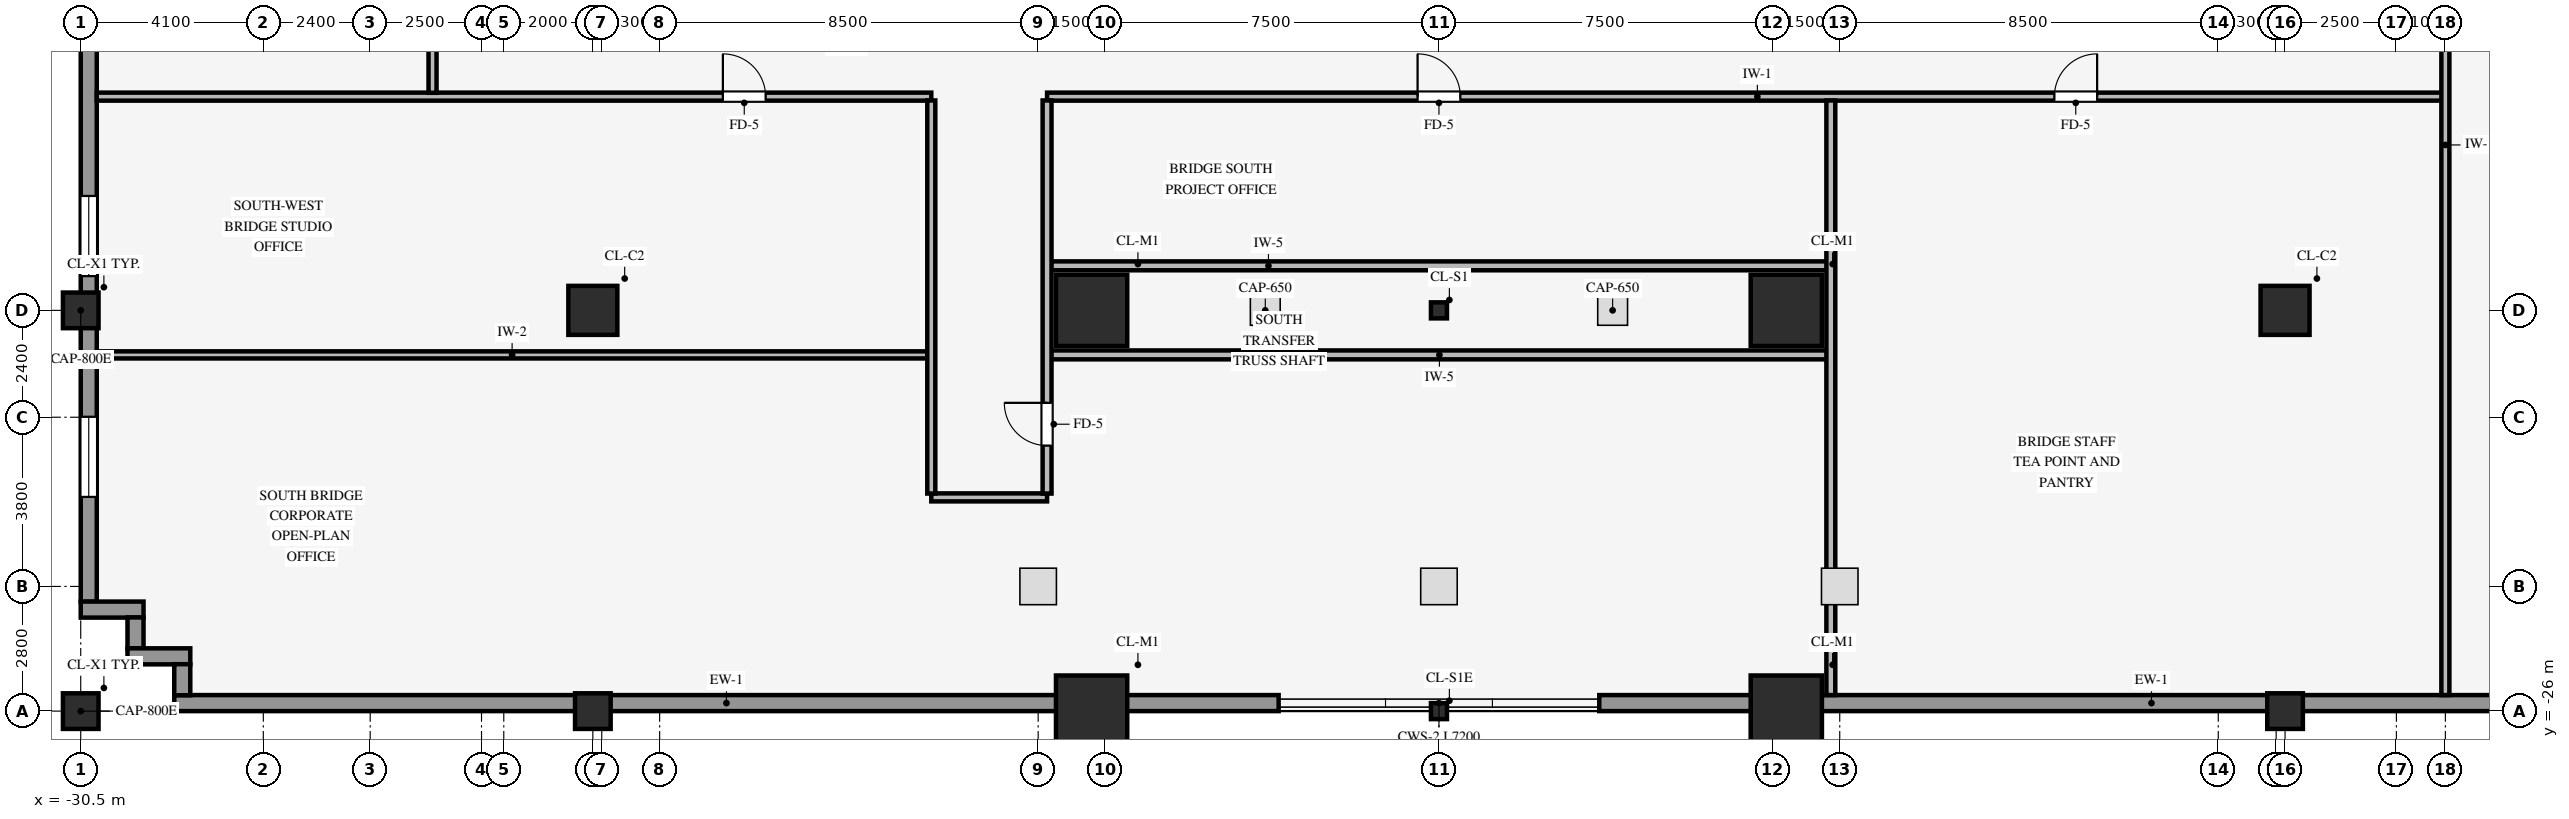
"""IFC4 building model, lengths in metres.
Left out: names, types, materials, properties, quantities, classifications, styles, units other than length and angle.
Written with IfcOpenShell. Run it as: python <this file> out.ifc"""

import sys

from ifc_helpers import new_model, si_unit, direction, frame, frame_2d, origin, origin_2d, place, context, subcontext, project, spatial, rectangle, hollow_rectangle, i_section, extrude, source, transform, mapped, element, fill, save


model = new_model("IFC4")
c1 = context("Model", 3, precision=1e-05, world=origin(), true_north=direction((0.0, 1.0)))
c2 = subcontext(c1, "Body", "Model", "MODEL_VIEW")
j1 = project(units=[si_unit("LENGTHUNIT", "METRE"), si_unit("PLANEANGLEUNIT", "RADIAN")], contexts=[c1])
p1 = place(None, origin())
s1 = spatial("IfcSite", under=j1, at=p1, CompositionType="ELEMENT")
p2 = place(p1, origin())
s2 = spatial("IfcBuilding", under=s1, at=p2, CompositionType="ELEMENT")
p3 = place(p2, frame((0.0, 0.0, 23.0)))
s3 = spatial("IfcBuildingStorey", under=s2, at=p3, CompositionType="ELEMENT", Elevation=23.0)
for number, where, z_axis, x_axis in (
    (1, (-7.8, -26.0, 0.0), (0.0, 0.0, 1.0), (1.0, 0.0, 0.0)),
    (2, (-7.8, -17.0, 0.0), (0.0, 0.0, 1.0), (1.0, 0.0, 0.0)),
    (3, (7.8, -26.0, 0.0), (0.0, 0.0, 1.0), (1.0, 0.0, 0.0)),
    (4, (7.8, -17.0, 0.0), (0.0, 0.0, 1.0), (1.0, 0.0, 0.0)),
):
    element("IfcColumn", number, at=place(p3, frame(where, z_axis=z_axis, x_axis=x_axis)), inside=s3, PredefinedType="COLUMN", context=c2, shape_type="SweptSolid", body=[
        extrude(rectangle(XDim=1.6, YDim=1.6, at=origin_2d()), origin(), (0.0, 0.0, 1.0), 4.2),
    ])
p4 = place(p3, frame((-30.5, -26.0, -0.4), z_axis=(0.0, 0.0, 1.0), x_axis=(1.0, 0.0, 0.0)))
e5 = element("IfcColumn", 5, at=p4, inside=s3, PredefinedType="COLUMN", context=c2, shape_type="SweptSolid", body=[
    extrude(hollow_rectangle(XDim=0.8, YDim=0.8, WallThickness=0.055, InnerFilletRadius=0.055, OuterFilletRadius=0.11, at=origin_2d()), origin(), (0.0, 0.0, 1.0), 4.6),
])
for number, where, z_axis, x_axis in (
    (6, (-30.5, -17.0, 0.0), (0.0, 0.0, 1.0), (1.0, 0.0, 0.0)),
    (7, (-19.0, -26.0, 0.0), (0.0, 0.0, 1.0), (1.0, 0.0, 0.0)),
):
    element("IfcColumn", number, at=place(p3, frame(where, z_axis=z_axis, x_axis=x_axis)), inside=s3, PredefinedType="COLUMN", context=c2, shape_type="SweptSolid", body=[
        extrude(hollow_rectangle(XDim=0.8, YDim=0.8, WallThickness=0.055, InnerFilletRadius=0.055, OuterFilletRadius=0.11, at=origin_2d()), origin(), (0.0, 0.0, 1.0), 4.2),
    ])
p5 = place(p3, frame((-19.0, -17.0, 0.0), z_axis=(0.0, 0.0, 1.0), x_axis=(1.0, 0.0, 0.0)))
e8 = element("IfcColumn", 8, at=p5, inside=s3, PredefinedType="COLUMN", context=c2, shape_type="SweptSolid", body=[
    extrude(rectangle(XDim=1.1, YDim=1.1, at=origin_2d()), origin(), (0.0, 0.0, 1.0), 4.2),
])
p6 = place(p3, frame((19.0, -26.0, 0.0), z_axis=(0.0, 0.0, 1.0), x_axis=(1.0, 0.0, 0.0)))
e9 = element("IfcColumn", 9, at=p6, inside=s3, PredefinedType="COLUMN", context=c2, shape_type="SweptSolid", body=[
    extrude(hollow_rectangle(XDim=0.8, YDim=0.8, WallThickness=0.055, InnerFilletRadius=0.055, OuterFilletRadius=0.11, at=origin_2d()), origin(), (0.0, 0.0, 1.0), 4.2),
])
p7 = place(p3, frame((19.0, -17.0, 0.0), z_axis=(0.0, 0.0, 1.0), x_axis=(1.0, 0.0, 0.0)))
e10 = element("IfcColumn", 10, at=p7, inside=s3, PredefinedType="COLUMN", context=c2, shape_type="SweptSolid", body=[
    extrude(rectangle(XDim=1.1, YDim=1.1, at=origin_2d()), origin(), (0.0, 0.0, 1.0), 4.2),
])
for number, where, z_axis, x_axis in (
    (11, (0.0, -26.0, 0.0), (0.0, 0.0, 1.0), (1.0, 0.0, 0.0)),
    (12, (0.0, -17.0, 0.0), (0.0, 0.0, 1.0), (1.0, 0.0, 0.0)),
):
    element("IfcColumn", number, at=place(p3, frame(where, z_axis=z_axis, x_axis=x_axis)), inside=s3, PredefinedType="COLUMN", context=c2, shape_type="SweptSolid", body=[
        extrude(i_section(OverallWidth=0.36, OverallDepth=0.36, WebThickness=0.021, FlangeThickness=0.021, FilletRadius=0.018, at=origin_2d()), origin(), (0.0, 0.0, 1.0), 4.2),
    ])
for number, where, z_axis, x_axis in (
    (13, (-28.4, -25.82, 0.0), (0.0, 0.0, 1.0), (1.0, 0.0, 0.0)),
    (14, (3.6, -25.82, 0.0), (0.0, 0.0, 1.0), (1.0, 0.0, 0.0)),
):
    element("IfcWall", number, at=place(p3, frame(where, z_axis=z_axis, x_axis=x_axis)), inside=s3, PredefinedType="STANDARD", context=c2, shape_type="SweptSolid", body=[
        extrude(rectangle(XDim=24.8, YDim=0.36, at=frame_2d((12.4, 0.0))), origin(), (0.0, 0.0, 1.0), 2.785),
    ])
p8 = place(p3, frame((-30.32, -23.544, 0.0), z_axis=(0.0, 0.0, 1.0), x_axis=(0.0, 1.0, 0.0)))
e15 = element("IfcWall", 15, at=p8, inside=s3, PredefinedType="STANDARD", context=c2, shape_type="SweptSolid", body=[
    extrude(rectangle(XDim=47.088, YDim=0.36, at=frame_2d((23.544, 0.0))), origin(), (0.0, 0.0, 1.0), 3.702),
])
p9 = place(p8, frame((2.354, 0.0, 0.85)))
e16 = element("IfcOpeningElement", 16, at=p9, cuts=e15, PredefinedType="OPENING", context=c2, shape_type="SweptSolid", body=[
    extrude(rectangle(XDim=1.8, YDim=2.35, at=frame_2d((0.9, 1.175))), frame((0.0, 0.19, 0.0), z_axis=(0.0, -1.0, 0.0), x_axis=(1.0, 0.0, 0.0)), (0.0, 0.0, 1.0), 0.38),
])
p10 = place(p8, frame((7.313, 0.0, 0.85)))
e17 = element("IfcOpeningElement", 17, at=p10, cuts=e15, PredefinedType="OPENING", context=c2, shape_type="SweptSolid", body=[
    extrude(rectangle(XDim=1.8, YDim=2.35, at=frame_2d((0.9, 1.175))), frame((0.0, 0.19, 0.0), z_axis=(0.0, -1.0, 0.0), x_axis=(1.0, 0.0, 0.0)), (0.0, 0.0, 1.0), 0.38),
])
p11 = place(p8, frame((15.881, 0.0, 0.85)))
e18 = element("IfcOpeningElement", 18, at=p11, cuts=e15, PredefinedType="OPENING", context=c2, shape_type="SweptSolid", body=[
    extrude(rectangle(XDim=1.8, YDim=2.35, at=frame_2d((0.9, 1.175))), frame((0.0, 0.19, 0.0), z_axis=(0.0, -1.0, 0.0), x_axis=(1.0, 0.0, 0.0)), (0.0, 0.0, 1.0), 0.38),
])
p12 = place(p8, frame((20.39, 0.0, 0.85)))
e19 = element("IfcOpeningElement", 19, at=p12, cuts=e15, PredefinedType="OPENING", context=c2, shape_type="SweptSolid", body=[
    extrude(rectangle(XDim=1.8, YDim=2.35, at=frame_2d((0.9, 1.175))), frame((0.0, 0.19, 0.0), z_axis=(0.0, -1.0, 0.0), x_axis=(1.0, 0.0, 0.0)), (0.0, 0.0, 1.0), 0.38),
])
p13 = place(p8, frame((24.898, 0.0, 0.85)))
e20 = element("IfcOpeningElement", 20, at=p13, cuts=e15, PredefinedType="OPENING", context=c2, shape_type="SweptSolid", body=[
    extrude(rectangle(XDim=1.8, YDim=2.35, at=frame_2d((0.9, 1.175))), frame((0.0, 0.19, 0.0), z_axis=(0.0, -1.0, 0.0), x_axis=(1.0, 0.0, 0.0)), (0.0, 0.0, 1.0), 0.38),
])
p14 = place(p8, frame((29.407, 0.0, 0.85)))
e21 = element("IfcOpeningElement", 21, at=p14, cuts=e15, PredefinedType="OPENING", context=c2, shape_type="SweptSolid", body=[
    extrude(rectangle(XDim=1.8, YDim=2.35, at=frame_2d((0.9, 1.175))), frame((0.0, 0.19, 0.0), z_axis=(0.0, -1.0, 0.0), x_axis=(1.0, 0.0, 0.0)), (0.0, 0.0, 1.0), 0.38),
])
p15 = place(p8, frame((37.975, 0.0, 0.85)))
e22 = element("IfcOpeningElement", 22, at=p15, cuts=e15, PredefinedType="OPENING", context=c2, shape_type="SweptSolid", body=[
    extrude(rectangle(XDim=1.8, YDim=2.35, at=frame_2d((0.9, 1.175))), frame((0.0, 0.19, 0.0), z_axis=(0.0, -1.0, 0.0), x_axis=(1.0, 0.0, 0.0)), (0.0, 0.0, 1.0), 0.38),
])
p16 = place(p8, frame((42.934, 0.0, 0.85)))
e23 = element("IfcOpeningElement", 23, at=p16, cuts=e15, PredefinedType="OPENING", context=c2, shape_type="SweptSolid", body=[
    extrude(rectangle(XDim=1.8, YDim=2.35, at=frame_2d((0.9, 1.175))), frame((0.0, 0.19, 0.0), z_axis=(0.0, -1.0, 0.0), x_axis=(1.0, 0.0, 0.0)), (0.0, 0.0, 1.0), 0.38),
])
p17 = place(p3, frame((-30.5, -23.72, 0.0), z_axis=(0.0, 0.0, 1.0), x_axis=(1.0, 0.0, 0.0)))
e24 = element("IfcWall", 24, at=p17, inside=s3, PredefinedType="STANDARD", context=c2, shape_type="SweptSolid", body=[
    extrude(rectangle(XDim=1.41, YDim=0.36, at=frame_2d((0.705, 0.0))), origin(), (0.0, 0.0, 1.0), 4.19),
])
p18 = place(p3, frame((-29.27, -24.594, 0.0), z_axis=(0.0, 0.0, 1.0), x_axis=(0.0, 1.0, 0.0)))
e25 = element("IfcWall", 25, at=p18, inside=s3, PredefinedType="STANDARD", context=c2, shape_type="SweptSolid", body=[
    extrude(rectangle(XDim=0.698, YDim=0.36, at=frame_2d((0.349, 0.0))), origin(), (0.0, 0.0, 1.0), 4.19),
])
p19 = place(p3, frame((-29.45, -24.77, 0.0), z_axis=(0.0, 0.0, 1.0), x_axis=(1.0, 0.0, 0.0)))
e26 = element("IfcWall", 26, at=p19, inside=s3, PredefinedType="STANDARD", context=c2, shape_type="SweptSolid", body=[
    extrude(rectangle(XDim=1.41, YDim=0.36, at=frame_2d((0.705, 0.0))), origin(), (0.0, 0.0, 1.0), 4.19),
])
p20 = place(p3, frame((-28.22, -25.644, 0.0), z_axis=(0.0, 0.0, 1.0), x_axis=(0.0, 1.0, 0.0)))
e27 = element("IfcWall", 27, at=p20, inside=s3, PredefinedType="STANDARD", context=c2, shape_type="SweptSolid", body=[
    extrude(rectangle(XDim=0.698, YDim=0.36, at=frame_2d((0.349, 0.0))), origin(), (0.0, 0.0, 1.0), 4.19),
])
p21 = place(p3, frame((-11.4, -21.2, 0.0), z_axis=(0.0, 0.0, 1.0), x_axis=(1.0, 0.0, 0.0)))
e28 = element("IfcWall", 28, at=p21, inside=s3, PredefinedType="PARTITIONING", context=c2, shape_type="SweptSolid", body=[
    extrude(rectangle(XDim=2.6, YDim=0.18, at=frame_2d((1.3, 0.0))), origin(), (0.0, 0.0, 1.0), 4.19),
])
p22 = place(p3, frame((-30.14, -18.0, 0.0), z_axis=(0.0, 0.0, 1.0), x_axis=(1.0, 0.0, 0.0)))
e29 = element("IfcWall", 29, at=p22, inside=s3, PredefinedType="PARTITIONING", context=c2, shape_type="SweptSolid", body=[
    extrude(rectangle(XDim=18.654, YDim=0.16, at=frame_2d((9.327, 0.0))), origin(), (0.0, 0.0, 1.0), 4.19),
])
for number, where, z_axis, x_axis in (
    (30, (-8.714, -18.0, 0.0), (0.0, 0.0, 1.0), (1.0, 0.0, 0.0)),
    (31, (-8.714, -16.0, 0.0), (0.0, 0.0, 1.0), (1.0, 0.0, 0.0)),
):
    element("IfcWall", number, at=place(p3, frame(where, z_axis=z_axis, x_axis=x_axis)), inside=s3, PredefinedType="STANDARD", context=c2, shape_type="SweptSolid", body=[
        extrude(rectangle(XDim=17.448, YDim=0.2, at=frame_2d((8.724, 0.0))), origin(), (0.0, 0.0, 1.0), 4.19),
    ])
p23 = place(p3, frame((-30.14, -12.2, 0.0), z_axis=(0.0, 0.0, 1.0), x_axis=(1.0, 0.0, 0.0)))
e32 = element("IfcWall", 32, at=p23, inside=s3, PredefinedType="PARTITIONING", context=c2, shape_type="SweptSolid", body=[
    extrude(rectangle(XDim=18.74, YDim=0.18, at=frame_2d((9.37, 0.0))), origin(), (0.0, 0.0, 1.0), 4.19),
])
p24 = place(p23, frame((14.06, 0.0, 0.0)))
e33 = element("IfcOpeningElement", 33, at=p24, cuts=e32, PredefinedType="OPENING", context=c2, shape_type="SweptSolid", body=[
    extrude(rectangle(XDim=0.96, YDim=2.1, at=frame_2d((0.48, 1.05))), frame((0.0, 0.1, 0.0), z_axis=(0.0, -1.0, 0.0), x_axis=(1.0, 0.0, 0.0)), (0.0, 0.0, 1.0), 0.2),
])
p25 = place(p3, frame((-8.8, -12.2, 0.0), z_axis=(0.0, 0.0, 1.0), x_axis=(1.0, 0.0, 0.0)))
e34 = element("IfcWall", 34, at=p25, inside=s3, PredefinedType="PARTITIONING", context=c2, shape_type="SweptSolid", body=[
    extrude(rectangle(XDim=31.334, YDim=0.18, at=frame_2d((15.667, 0.0))), origin(), (0.0, 0.0, 1.0), 4.19),
])
p26 = place(p25, frame((8.32, 0.0, 0.0)))
e35 = element("IfcOpeningElement", 35, at=p26, cuts=e34, PredefinedType="OPENING", context=c2, shape_type="SweptSolid", body=[
    extrude(rectangle(XDim=0.96, YDim=2.1, at=frame_2d((0.48, 1.05))), frame((0.0, 0.1, 0.0), z_axis=(0.0, -1.0, 0.0), x_axis=(1.0, 0.0, 0.0)), (0.0, 0.0, 1.0), 0.2),
])
p27 = place(p25, frame((22.62, 0.0, 0.0)))
e36 = element("IfcOpeningElement", 36, at=p27, cuts=e34, PredefinedType="OPENING", context=c2, shape_type="SweptSolid", body=[
    extrude(rectangle(XDim=0.96, YDim=2.1, at=frame_2d((0.48, 1.05))), frame((0.0, 0.1, 0.0), z_axis=(0.0, -1.0, 0.0), x_axis=(1.0, 0.0, 0.0)), (0.0, 0.0, 1.0), 0.2),
])
p28 = place(p3, frame((-22.6, -12.114, 0.0), z_axis=(0.0, 0.0, 1.0), x_axis=(0.0, 1.0, 0.0)))
e37 = element("IfcWall", 37, at=p28, inside=s3, PredefinedType="PARTITIONING", context=c2, shape_type="SweptSolid", body=[
    extrude(rectangle(XDim=24.228, YDim=0.18, at=frame_2d((12.114, 0.0))), origin(), (0.0, 0.0, 1.0), 4.19),
])
p29 = place(p28, frame((11.634, 0.0, 0.0)))
e38 = element("IfcOpeningElement", 38, at=p29, cuts=e37, PredefinedType="OPENING", context=c2, shape_type="SweptSolid", body=[
    extrude(rectangle(XDim=0.96, YDim=2.1, at=frame_2d((0.48, 1.05))), frame((0.0, 0.1, 0.0), z_axis=(0.0, -1.0, 0.0), x_axis=(1.0, 0.0, 0.0)), (0.0, 0.0, 1.0), 0.2),
])
p30 = place(p3, frame((-11.4, -21.114, 0.0), z_axis=(0.0, 0.0, 1.0), x_axis=(0.0, 1.0, 0.0)))
e39 = element("IfcWall", 39, at=p30, inside=s3, PredefinedType="PARTITIONING", context=c2, shape_type="SweptSolid", body=[
    extrude(rectangle(XDim=8.828, YDim=0.18, at=frame_2d((4.414, 0.0))), origin(), (0.0, 0.0, 1.0), 4.19),
])
p31 = place(p3, frame((-8.8, -21.114, 0.0), z_axis=(0.0, 0.0, 1.0), x_axis=(0.0, 1.0, 0.0)))
e40 = element("IfcWall", 40, at=p31, inside=s3, PredefinedType="STANDARD", context=c2, shape_type="SweptSolid", body=[
    extrude(rectangle(XDim=8.828, YDim=0.2, at=frame_2d((4.414, 0.0))), origin(), (0.0, 0.0, 1.0), 2.785),
])
p32 = place(p31, frame((1.077, 0.0, 0.0)))
e41 = element("IfcOpeningElement", 41, at=p32, cuts=e40, PredefinedType="OPENING", context=c2, shape_type="SweptSolid", body=[
    extrude(rectangle(XDim=0.96, YDim=2.1, at=frame_2d((0.48, 1.05))), frame((0.0, 0.11, 0.0), z_axis=(0.0, -1.0, 0.0), x_axis=(1.0, 0.0, 0.0)), (0.0, 0.0, 1.0), 0.22),
])
p33 = place(p3, frame((8.8, -25.64, 0.0), z_axis=(0.0, 0.0, 1.0), x_axis=(0.0, 1.0, 0.0)))
e42 = element("IfcWall", 42, at=p33, inside=s3, PredefinedType="STANDARD", context=c2, shape_type="SweptSolid", body=[
    extrude(rectangle(XDim=13.354, YDim=0.2, at=frame_2d((6.677, 0.0))), origin(), (0.0, 0.0, 1.0), 2.785),
])
p34 = place(p3, frame((22.6, -25.64, 0.0), z_axis=(0.0, 0.0, 1.0), x_axis=(0.0, 1.0, 0.0)))
e43 = element("IfcWall", 43, at=p34, inside=s3, PredefinedType="PARTITIONING", context=c2, shape_type="SweptSolid", body=[
    extrude(rectangle(XDim=51.28, YDim=0.18, at=frame_2d((25.64, 0.0))), origin(), (0.0, 0.0, 1.0), 4.19),
])
p35 = place(p34, frame((25.16, 0.0, 0.0)))
e44 = element("IfcOpeningElement", 44, at=p35, cuts=e43, PredefinedType="OPENING", context=c2, shape_type="SweptSolid", body=[
    extrude(rectangle(XDim=0.96, YDim=2.1, at=frame_2d((0.48, 1.05))), frame((0.0, 0.1, 0.0), z_axis=(0.0, -1.0, 0.0), x_axis=(1.0, 0.0, 0.0)), (0.0, 0.0, 1.0), 0.2),
])
p36 = place(p34, frame((43.09, 0.0, 0.0)))
e45 = element("IfcOpeningElement", 45, at=p36, cuts=e43, PredefinedType="OPENING", context=c2, shape_type="SweptSolid", body=[
    extrude(rectangle(XDim=0.9, YDim=2.1, at=frame_2d((0.45, 1.05))), frame((0.0, 0.1, 0.0), z_axis=(0.0, -1.0, 0.0), x_axis=(1.0, 0.0, 0.0)), (0.0, 0.0, 1.0), 0.2),
])
p37 = place(p34, frame((38.89, 0.0, 0.0)))
e46 = element("IfcOpeningElement", 46, at=p37, cuts=e43, PredefinedType="OPENING", context=c2, shape_type="SweptSolid", body=[
    extrude(rectangle(XDim=0.9, YDim=2.1, at=frame_2d((0.45, 1.05))), frame((0.0, 0.1, 0.0), z_axis=(0.0, -1.0, 0.0), x_axis=(1.0, 0.0, 0.0)), (0.0, 0.0, 1.0), 0.2),
])
p38 = place(p34, frame((47.29, 0.0, 0.0)))
e47 = element("IfcOpeningElement", 47, at=p38, cuts=e43, PredefinedType="OPENING", context=c2, shape_type="SweptSolid", body=[
    extrude(rectangle(XDim=0.9, YDim=2.1, at=frame_2d((0.45, 1.05))), frame((0.0, 0.1, 0.0), z_axis=(0.0, -1.0, 0.0), x_axis=(1.0, 0.0, 0.0)), (0.0, 0.0, 1.0), 0.2),
])
m1 = source(origin(), c2, "Body", "SweptSolid", [
    extrude(rectangle(XDim=1.8, YDim=2.35, at=frame_2d((0.9, 1.175))), frame((0.0, 0.03, 0.0), z_axis=(0.0, -1.0, 0.0), x_axis=(1.0, 0.0, 0.0)), (0.0, 0.0, 1.0), 0.06),
])
p39 = place(p9, origin())
e48 = element("IfcWindow", 48, at=p39, inside=s3, PartitioningType="SINGLE_PANEL", PredefinedType="WINDOW", context=c2, shape_type="MappedRepresentation", body=[
    mapped(m1, transform((0.0, 0.0, 0.0), scale=1.0)),
])
fill(e16, e48)
p40 = place(p10, origin())
e49 = element("IfcWindow", 49, at=p40, inside=s3, PartitioningType="SINGLE_PANEL", PredefinedType="WINDOW", context=c2, shape_type="MappedRepresentation", body=[
    mapped(m1, transform((0.0, 0.0, 0.0), scale=1.0)),
])
fill(e17, e49)
m2 = source(origin(), c2, "Body", "SweptSolid", [
    extrude(rectangle(XDim=0.96, YDim=2.1, at=frame_2d((0.48, 1.05))), frame((0.0, 0.025, 0.0), z_axis=(0.0, -1.0, 0.0), x_axis=(1.0, 0.0, 0.0)), (0.0, 0.0, 1.0), 0.05),
])
p41 = place(p26, origin())
e50 = element("IfcDoor", 50, at=p41, inside=s3, OperationType="SINGLE_SWING_LEFT", PredefinedType="DOOR", context=c2, shape_type="MappedRepresentation", body=[
    mapped(m2, transform((0.0, 0.0, 0.0), scale=1.0)),
])
fill(e35, e50)
p42 = place(p27, origin())
e51 = element("IfcDoor", 51, at=p42, inside=s3, OperationType="SINGLE_SWING_RIGHT", PredefinedType="DOOR", context=c2, shape_type="MappedRepresentation", body=[
    mapped(m2, transform((0.0, 0.0, 0.0), scale=1.0)),
])
fill(e36, e51)
p43 = place(p24, origin())
e52 = element("IfcDoor", 52, at=p43, inside=s3, OperationType="SINGLE_SWING_LEFT", PredefinedType="DOOR", context=c2, shape_type="MappedRepresentation", body=[
    mapped(m2, transform((0.0, 0.0, 0.0), scale=1.0)),
])
fill(e33, e52)
p44 = place(p32, origin())
e53 = element("IfcDoor", 53, at=p44, inside=s3, OperationType="SINGLE_SWING_RIGHT", PredefinedType="DOOR", context=c2, shape_type="MappedRepresentation", body=[
    mapped(m2, transform((0.0, 0.0, 0.0), scale=1.0)),
])
fill(e41, e53)
save(model, sys.argv[1])
